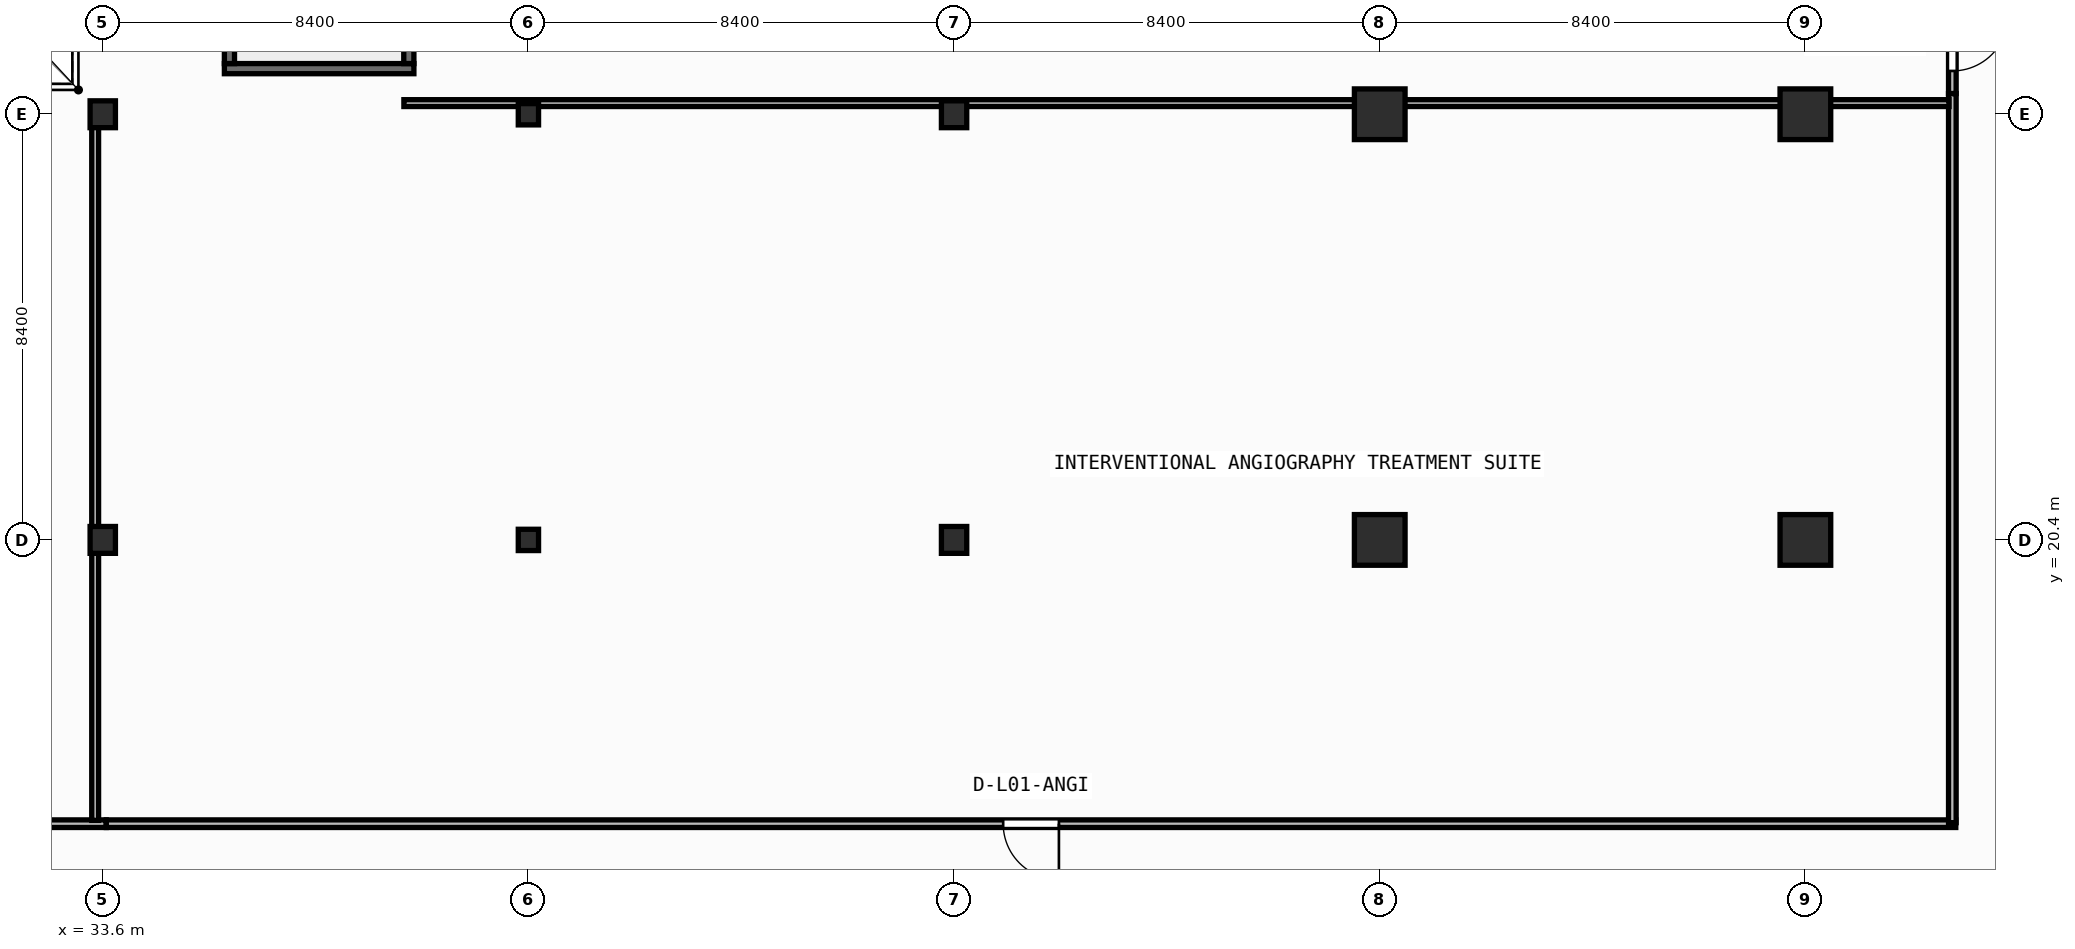
"""IFC4 building model, lengths in metres.
Left out: names, types, materials, properties, quantities, classifications, styles, units other than length and angle.
Written with IfcOpenShell. Run it as: python <this file> out.ifc"""

import sys

from ifc_helpers import new_model, si_unit, direction, frame, frame_2d, origin, origin_2d, place, context, subcontext, project, spatial, rectangle, circle, i_section, extrude, element, fill, save


model = new_model("IFC4")
c1 = context("Model", 3, precision=1e-05, world=origin(), true_north=direction((0.0, 1.0)))
c2 = subcontext(c1, "Body", "Model", "MODEL_VIEW")
j1 = project(units=[si_unit("LENGTHUNIT", "METRE"), si_unit("PLANEANGLEUNIT", "RADIAN")], contexts=[c1])
p1 = place(None, origin())
s1 = spatial("IfcSite", under=j1, at=p1, CompositionType="ELEMENT")
p2 = place(p1, origin())
s2 = spatial("IfcBuilding", under=s1, at=p2, CompositionType="ELEMENT")
p3 = place(p2, frame((0.0, 0.0, 4.5)))
s3 = spatial("IfcBuildingStorey", under=s2, at=p3, CompositionType="ELEMENT", Elevation=4.5)
p4 = place(p3, frame((33.6, 20.4, 0.0), z_axis=(0.0, 0.0, 1.0), x_axis=(1.0, 0.0, 0.0)))
e1 = element("IfcColumn", 1, at=p4, inside=s3, PredefinedType="COLUMN", context=c2, shape_type="SweptSolid", body=[
    extrude(i_section(OverallWidth=0.5, OverallDepth=0.53, WebThickness=0.028, FlangeThickness=0.045, at=origin_2d()), origin(), (0.0, 0.0, 1.0), 4.5),
])
p5 = place(p3, frame((42.0, 20.4, 0.0), z_axis=(0.0, 0.0, 1.0), x_axis=(1.0, 0.0, 0.0)))
e2 = element("IfcColumn", 2, at=p5, inside=s3, PredefinedType="COLUMN", context=c2, shape_type="SweptSolid", body=[
    extrude(i_section(OverallWidth=0.4, OverallDepth=0.42, WebThickness=0.025, FlangeThickness=0.04, at=origin_2d()), origin(), (0.0, 0.0, 1.0), 4.5),
])
p6 = place(p3, frame((50.4, 20.4, 0.0), z_axis=(0.0, 0.0, 1.0), x_axis=(1.0, 0.0, 0.0)))
e3 = element("IfcColumn", 3, at=p6, inside=s3, PredefinedType="COLUMN", context=c2, shape_type="SweptSolid", body=[
    extrude(i_section(OverallWidth=0.5, OverallDepth=0.53, WebThickness=0.028, FlangeThickness=0.045, at=origin_2d()), origin(), (0.0, 0.0, 1.0), 4.5),
])
for number, where, z_axis, x_axis in (
    (4, (58.8, 20.4, 0.0), (0.0, 0.0, 1.0), (1.0, 0.0, 0.0)),
    (5, (67.2, 20.4, 0.0), (0.0, 0.0, 1.0), (1.0, 0.0, 0.0)),
):
    element("IfcColumn", number, at=place(p3, frame(where, z_axis=z_axis, x_axis=x_axis)), inside=s3, PredefinedType="COLUMN", context=c2, shape_type="SweptSolid", body=[
        extrude(circle(Radius=0.5, at=origin_2d()), origin(), (0.0, 0.0, 1.0), 4.5),
    ])
p7 = place(p3, frame((33.6, 28.8, 0.0), z_axis=(0.0, 0.0, 1.0), x_axis=(1.0, 0.0, 0.0)))
e6 = element("IfcColumn", 6, at=p7, inside=s3, PredefinedType="COLUMN", context=c2, shape_type="SweptSolid", body=[
    extrude(i_section(OverallWidth=0.5, OverallDepth=0.53, WebThickness=0.028, FlangeThickness=0.045, at=origin_2d()), origin(), (0.0, 0.0, 1.0), 4.5),
])
p8 = place(p3, frame((42.0, 28.8, 0.0), z_axis=(0.0, 0.0, 1.0), x_axis=(1.0, 0.0, 0.0)))
e7 = element("IfcColumn", 7, at=p8, inside=s3, PredefinedType="COLUMN", context=c2, shape_type="SweptSolid", body=[
    extrude(i_section(OverallWidth=0.4, OverallDepth=0.42, WebThickness=0.025, FlangeThickness=0.04, at=origin_2d()), origin(), (0.0, 0.0, 1.0), 4.5),
])
p9 = place(p3, frame((50.4, 28.8, 0.0), z_axis=(0.0, 0.0, 1.0), x_axis=(1.0, 0.0, 0.0)))
e8 = element("IfcColumn", 8, at=p9, inside=s3, PredefinedType="COLUMN", context=c2, shape_type="SweptSolid", body=[
    extrude(i_section(OverallWidth=0.5, OverallDepth=0.53, WebThickness=0.028, FlangeThickness=0.045, at=origin_2d()), origin(), (0.0, 0.0, 1.0), 4.5),
])
for number, where, z_axis, x_axis in (
    (9, (58.8, 28.8, 0.0), (0.0, 0.0, 1.0), (1.0, 0.0, 0.0)),
    (10, (67.2, 28.8, 0.0), (0.0, 0.0, 1.0), (1.0, 0.0, 0.0)),
):
    element("IfcColumn", number, at=place(p3, frame(where, z_axis=z_axis, x_axis=x_axis)), inside=s3, PredefinedType="COLUMN", context=c2, shape_type="SweptSolid", body=[
        extrude(circle(Radius=0.5, at=origin_2d()), origin(), (0.0, 0.0, 1.0), 4.5),
    ])
p10 = place(p3, frame((36.0, 29.7, 0.0), z_axis=(0.0, 0.0, 1.0), x_axis=(1.0, 0.0, 0.0)))
e11 = element("IfcWall", 11, at=p10, inside=s3, PredefinedType="SHEAR", context=c2, shape_type="SweptSolid", body=[
    extrude(rectangle(XDim=3.74, YDim=0.2, at=frame_2d((1.87, 0.0))), origin(), (0.0, 0.0, 1.0), 4.25),
])
for number, where, z_axis, x_axis in (
    (12, (36.1, 29.8, 0.0), (0.0, 0.0, 1.0), (0.0, 1.0, 0.0)),
    (13, (39.64, 29.8, 0.0), (0.0, 0.0, 1.0), (0.0, 1.0, 0.0)),
):
    element("IfcWall", number, at=place(p3, frame(where, z_axis=z_axis, x_axis=x_axis)), inside=s3, PredefinedType="SHEAR", context=c2, shape_type="SweptSolid", body=[
        extrude(rectangle(XDim=6.8, YDim=0.2, at=frame_2d((3.4, 0.0))), origin(), (0.0, 0.0, 1.0), 4.25),
    ])
p11 = place(p3, frame((33.668, 14.8, 0.0), z_axis=(0.0, 0.0, 1.0), x_axis=(-1.0, 0.0, 0.0)))
e14 = element("IfcWall", 14, at=p11, inside=s3, PredefinedType="PARTITIONING", context=c2, shape_type="SweptSolid", body=[
    extrude(rectangle(XDim=16.548, YDim=0.15, at=frame_2d((8.274, 0.0))), origin(), (0.0, 0.0, 1.0), 4.25),
])
p12 = place(p11, frame((7.724, 0.0, 0.0)))
e15 = element("IfcOpeningElement", 15, at=p12, cuts=e14, PredefinedType="OPENING", context=c2, shape_type="SweptSolid", body=[
    extrude(rectangle(XDim=1.1, YDim=2.1, at=frame_2d((0.55, 1.05))), frame((0.0, 0.085, 0.0), z_axis=(0.0, -1.0, 0.0), x_axis=(1.0, 0.0, 0.0)), (0.0, 0.0, 1.0), 0.17),
])
p13 = place(p3, frame((70.168, 14.8, 0.0), z_axis=(0.0, 0.0, 1.0), x_axis=(-1.0, 0.0, 0.0)))
e16 = element("IfcWall", 16, at=p13, inside=s3, PredefinedType="PARTITIONING", context=c2, shape_type="SweptSolid", body=[
    extrude(rectangle(XDim=36.498, YDim=0.15, at=frame_2d((18.249, 0.0))), origin(), (0.0, 0.0, 1.0), 4.25),
])
p14 = place(p13, frame((17.699, 0.0, 0.0)))
e17 = element("IfcOpeningElement", 17, at=p14, cuts=e16, PredefinedType="OPENING", context=c2, shape_type="SweptSolid", body=[
    extrude(rectangle(XDim=1.1, YDim=2.1, at=frame_2d((0.55, 1.05))), frame((0.0, 0.085, 0.0), z_axis=(0.0, -1.0, 0.0), x_axis=(1.0, 0.0, 0.0)), (0.0, 0.0, 1.0), 0.17),
])
p15 = place(p3, frame((70.1, 29.207, 0.0), z_axis=(0.0, 0.0, 1.0), x_axis=(0.0, -1.0, 0.0)))
e18 = element("IfcWall", 18, at=p15, inside=s3, PredefinedType="PARTITIONING", context=c2, shape_type="SweptSolid", body=[
    extrude(rectangle(XDim=14.387, YDim=0.15, at=frame_2d((7.194, 0.0))), origin(), (0.0, 0.0, 1.0), 4.25),
])
p16 = place(p3, frame((70.1, 31.2, 0.0), z_axis=(0.0, 0.0, 1.0), x_axis=(0.0, -1.0, 0.0)))
e19 = element("IfcWall", 19, at=p16, inside=s3, PredefinedType="PARTITIONING", context=c2, shape_type="SweptSolid", body=[
    extrude(rectangle(XDim=1.991, YDim=0.15, at=frame_2d((0.995, 0.0))), origin(), (0.0, 0.0, 1.0), 4.25),
])
p17 = place(p16, frame((0.445, 0.0, 0.0)))
e20 = element("IfcOpeningElement", 20, at=p17, cuts=e19, PredefinedType="OPENING", context=c2, shape_type="SweptSolid", body=[
    extrude(rectangle(XDim=1.1, YDim=2.1, at=frame_2d((0.55, 1.05))), frame((0.0, 0.085, 0.0), z_axis=(0.0, -1.0, 0.0), x_axis=(1.0, 0.0, 0.0)), (0.0, 0.0, 1.0), 0.17),
])
p18 = place(p3, frame((33.45, 14.865, 0.0), z_axis=(0.0, 0.0, 1.0), x_axis=(0.0, 1.0, 0.0)))
e21 = element("IfcWall", 21, at=p18, inside=s3, PredefinedType="PARTITIONING", context=c2, shape_type="SweptSolid", body=[
    extrude(rectangle(XDim=14.155, YDim=0.135, at=frame_2d((7.078, 0.0))), origin(), (0.0, 0.0, 1.0), 3.623),
])
p19 = place(p3, frame((70.035, 29.02, 0.0), z_axis=(0.0, 0.0, 1.0), x_axis=(-1.0, 0.0, 0.0)))
e22 = element("IfcWall", 22, at=p19, inside=s3, PredefinedType="PARTITIONING", context=c2, shape_type="SweptSolid", body=[
    extrude(rectangle(XDim=30.492, YDim=0.135, at=frame_2d((15.246, 0.0))), origin(), (0.0, 0.0, 1.0), 3.425),
])
p20 = place(p14, origin())
e23 = element("IfcDoor", 23, at=p20, inside=s3, OperationType="SINGLE_SWING_LEFT", PredefinedType="DOOR", context=c2, shape_type="SweptSolid", body=[
    extrude(rectangle(XDim=1.1, YDim=2.1, at=frame_2d((0.55, 1.05))), frame((0.0, 0.025, 0.0), z_axis=(0.0, -1.0, 0.0), x_axis=(1.0, 0.0, 0.0)), (0.0, 0.0, 1.0), 0.05),
])
fill(e17, e23)
p21 = place(p17, origin())
e24 = element("IfcDoor", 24, at=p21, inside=s3, OperationType="SINGLE_SWING_LEFT", PredefinedType="DOOR", context=c2, shape_type="SweptSolid", body=[
    extrude(rectangle(XDim=1.1, YDim=2.1, at=frame_2d((0.55, 1.05))), frame((0.0, 0.025, 0.0), z_axis=(0.0, -1.0, 0.0), x_axis=(1.0, 0.0, 0.0)), (0.0, 0.0, 1.0), 0.05),
])
fill(e20, e24)
save(model, sys.argv[1])
